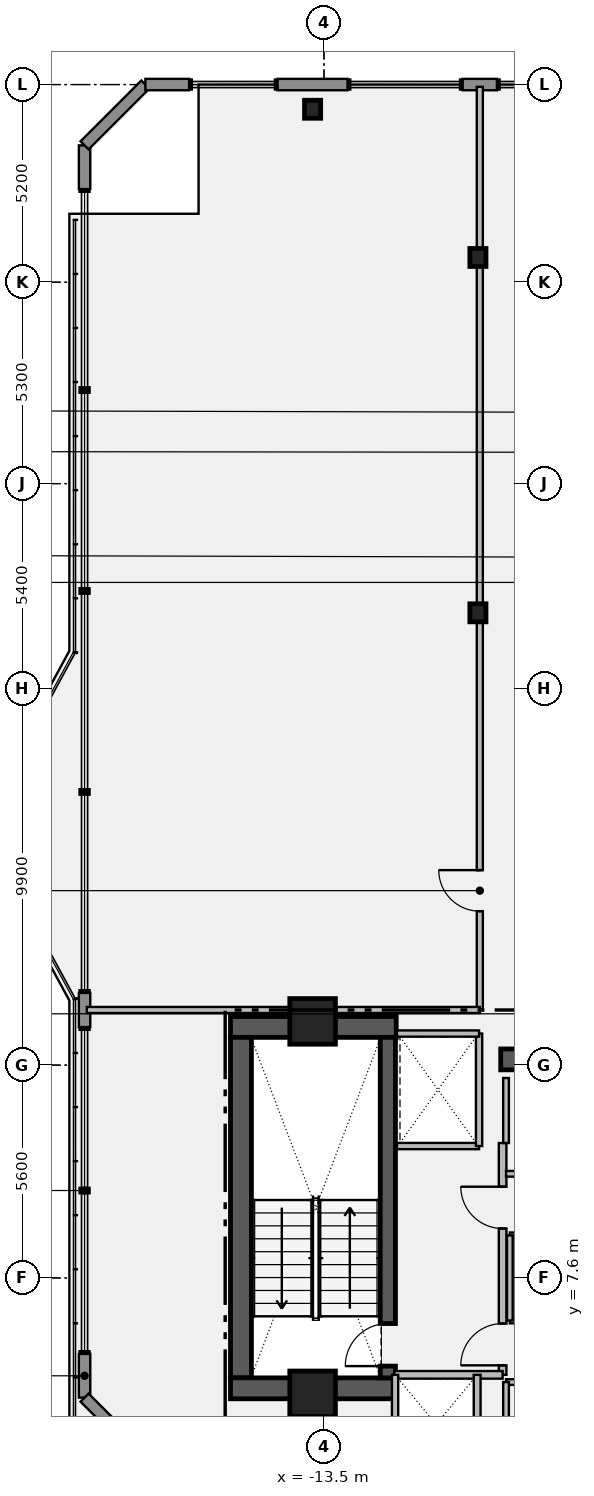
"""IFC4 building model, lengths in metres.
Left out: names, types, materials, properties, quantities, classifications, styles, units other than length and angle.
Written with IfcOpenShell. Run it as: python <this file> out.ifc"""

import sys

from ifc_helpers import new_model, si_unit, direction, frame, frame_2d, origin, origin_2d, place, context, subcontext, project, spatial, rectangle, i_section, extrude, element, fill, save


model = new_model("IFC4")
c1 = context("Model", 3, precision=1e-05, world=origin(), true_north=direction((0.0, 1.0)))
c2 = subcontext(c1, "Body", "Model", "MODEL_VIEW")
j1 = project(units=[si_unit("LENGTHUNIT", "METRE"), si_unit("PLANEANGLEUNIT", "RADIAN")], contexts=[c1])
p1 = place(None, origin())
s1 = spatial("IfcSite", under=j1, at=p1, CompositionType="ELEMENT")
p2 = place(p1, origin())
s2 = spatial("IfcBuilding", under=s1, at=p2, CompositionType="ELEMENT")
p3 = place(p2, frame((0.0, 0.0, 297.25)))
s3 = spatial("IfcBuildingStorey", under=s2, at=p3, CompositionType="ELEMENT", Elevation=297.25)
p4 = place(p3, frame((-15.96, 14.205, 0.0), z_axis=(0.0, 0.0, 1.0), x_axis=(1.0, 0.0, 0.0)))
e1 = element("IfcWall", 1, at=p4, inside=s3, PredefinedType="SHEAR", context=c2, shape_type="SweptSolid", body=[
    extrude(rectangle(XDim=4.36, YDim=0.55, at=frame_2d((2.18, 0.0))), origin(), (0.0, 0.0, 1.0), 3.61),
])
p5 = place(p3, frame((-15.685, 4.97, 0.0), z_axis=(0.0, 0.0, 1.0), x_axis=(0.0, 1.0, 0.0)))
e2 = element("IfcWall", 2, at=p5, inside=s3, PredefinedType="SHEAR", context=c2, shape_type="SweptSolid", body=[
    extrude(rectangle(XDim=8.96, YDim=0.55, at=frame_2d((4.48, 0.0))), origin(), (0.0, 0.0, 1.0), 3.61),
])
p6 = place(p3, frame((-15.96, 4.695, 0.0), z_axis=(0.0, 0.0, 1.0), x_axis=(1.0, 0.0, 0.0)))
e3 = element("IfcWall", 3, at=p6, inside=s3, PredefinedType="SHEAR", context=c2, shape_type="SweptSolid", body=[
    extrude(rectangle(XDim=4.36, YDim=0.55, at=frame_2d((2.18, 0.0))), origin(), (0.0, 0.0, 1.0), 3.61),
])
p7 = place(p3, frame((-8.85, 13.35, 0.0), z_axis=(0.0, 0.0, 1.0), x_axis=(1.0, 0.0, 0.0)))
e4 = element("IfcWall", 4, at=p7, inside=s3, PredefinedType="SHEAR", context=c2, shape_type="SweptSolid", body=[
    extrude(rectangle(XDim=7.6, YDim=0.55, at=frame_2d((3.8, 0.0))), origin(), (0.0, 0.0, 1.0), 3.56),
])
p8 = place(p3, frame((-11.82, 4.97, 0.0), z_axis=(0.0, 0.0, 1.0), x_axis=(0.0, 1.0, 0.0)))
e5 = element("IfcWall", 5, at=p8, inside=s3, PredefinedType="SHEAR", context=c2, shape_type="SweptSolid", body=[
    extrude(rectangle(XDim=8.96, YDim=0.4, at=frame_2d((4.48, 0.0))), origin(), (0.0, 0.0, 1.0), 3.61),
])
p9 = place(p8, frame((0.31, 0.0, 0.0)))
e6 = element("IfcOpeningElement", 6, at=p9, cuts=e5, PredefinedType="OPENING", context=c2, shape_type="SweptSolid", body=[
    extrude(rectangle(XDim=1.12, YDim=2.22, at=frame_2d((0.56, 1.11))), frame((0.0, 0.21, 0.0), z_axis=(0.0, -1.0, 0.0), x_axis=(1.0, 0.0, 0.0)), (0.0, 0.0, 1.0), 0.42),
])
for number, where, z_axis, x_axis in (
    (7, (-13.8, 14.35, 0.0), (0.0, 0.0, 1.0), (1.0, 0.0, 0.0)),
    (8, (-13.8, 4.55, 0.0), (0.0, 0.0, 1.0), (1.0, 0.0, 0.0)),
):
    element("IfcColumn", number, at=place(p3, frame(where, z_axis=z_axis, x_axis=x_axis)), inside=s3, PredefinedType="COLUMN", context=c2, shape_type="SweptSolid", body=[
        extrude(rectangle(XDim=1.2, YDim=1.2, at=origin_2d()), origin(), (0.0, 0.0, 1.0), 3.8),
    ])
p10 = place(p3, frame((-9.45, 25.1, -0.24), z_axis=(0.0, 0.0, 1.0), x_axis=(1.0, 0.0, 0.0)))
e9 = element("IfcColumn", 9, at=p10, inside=s3, PredefinedType="COLUMN", context=c2, shape_type="SweptSolid", body=[
    extrude(i_section(OverallWidth=0.424, OverallDepth=0.474, WebThickness=0.048, FlangeThickness=0.077, at=origin_2d()), origin(), (0.0, 0.0, 1.0), 4.04),
])
for number, where, z_axis, x_axis in (
    (10, (-9.45, 34.45, 0.0), (0.0, 0.0, 1.0), (1.0, 0.0, 0.0)),
    (11, (-13.8, 38.35, 0.0), (0.0, 0.0, 1.0), (1.0, 0.0, 0.0)),
):
    element("IfcColumn", number, at=place(p3, frame(where, z_axis=z_axis, x_axis=x_axis)), inside=s3, PredefinedType="COLUMN", context=c2, shape_type="SweptSolid", body=[
        extrude(i_section(OverallWidth=0.424, OverallDepth=0.474, WebThickness=0.048, FlangeThickness=0.077, at=origin_2d()), origin(), (0.0, 0.0, 1.0), 3.8),
    ])
p11 = place(p3, frame((-19.8, 4.45, 0.0), z_axis=(0.0, 0.0, 1.0), x_axis=(0.0, 1.0, 0.0)))
e12 = element("IfcWall", 12, at=p11, inside=s3, PredefinedType="STANDARD", context=c2, shape_type="SweptSolid", body=[
    extrude(rectangle(XDim=1.15, YDim=0.3, at=frame_2d((0.575, 0.0))), origin(), (0.0, 0.0, 1.0), 3.56),
])
p12 = place(p3, frame((-19.8, 14.2, 0.0), z_axis=(0.0, 0.0, 1.0), x_axis=(0.0, 1.0, 0.0)))
e13 = element("IfcWall", 13, at=p12, inside=s3, PredefinedType="STANDARD", context=c2, shape_type="SweptSolid", body=[
    extrude(rectangle(XDim=0.9, YDim=0.3, at=frame_2d((0.45, 0.0))), origin(), (0.0, 0.0, 1.0), 3.56),
])
p13 = place(p3, frame((-19.8, 36.25, 0.0), z_axis=(0.0, 0.0, 1.0), x_axis=(0.0, 1.0, 0.0)))
e14 = element("IfcWall", 14, at=p13, inside=s3, PredefinedType="STANDARD", context=c2, shape_type="SweptSolid", body=[
    extrude(rectangle(XDim=1.15, YDim=0.3, at=frame_2d((0.575, 0.0))), origin(), (0.0, 0.0, 1.0), 3.56),
])
p14 = place(p3, frame((-19.8, 37.4, 0.0), z_axis=(0.0, 0.0, 1.0), x_axis=(0.707106781187, 0.707106781187, 0.0)))
e15 = element("IfcWall", 15, at=p14, inside=s3, PredefinedType="STANDARD", context=c2, shape_type="SweptSolid", body=[
    extrude(rectangle(XDim=2.263, YDim=0.3, at=frame_2d((1.131, 0.0))), origin(), (0.0, 0.0, 1.0), 3.56),
])
p15 = place(p3, frame((-18.2, 39.0, 0.0), z_axis=(0.0, 0.0, 1.0), x_axis=(1.0, 0.0, 0.0)))
e16 = element("IfcWall", 16, at=p15, inside=s3, PredefinedType="STANDARD", context=c2, shape_type="SweptSolid", body=[
    extrude(rectangle(XDim=1.15, YDim=0.3, at=frame_2d((0.575, 0.0))), origin(), (0.0, 0.0, 1.0), 3.56),
])
p16 = place(p3, frame((-14.72, 39.0, 0.0), z_axis=(0.0, 0.0, 1.0), x_axis=(1.0, 0.0, 0.0)))
e17 = element("IfcWall", 17, at=p16, inside=s3, PredefinedType="STANDARD", context=c2, shape_type="SweptSolid", body=[
    extrude(rectangle(XDim=1.84, YDim=0.3, at=frame_2d((0.92, 0.0))), origin(), (0.0, 0.0, 1.0), 3.56),
])
p17 = place(p3, frame((-9.85, 39.0, 0.0), z_axis=(0.0, 0.0, 1.0), x_axis=(1.0, 0.0, 0.0)))
e18 = element("IfcWall", 18, at=p17, inside=s3, PredefinedType="STANDARD", context=c2, shape_type="SweptSolid", body=[
    extrude(rectangle(XDim=0.9, YDim=0.3, at=frame_2d((0.45, 0.0))), origin(), (0.0, 0.0, 1.0), 3.56),
])
p18 = place(p3, frame((-18.2, 2.85, 0.0), z_axis=(0.0, 0.0, 1.0), x_axis=(-0.707160727918, 0.707052830339, 0.0)))
e19 = element("IfcWall", 19, at=p18, inside=s3, PredefinedType="STANDARD", context=c2, shape_type="SweptSolid", body=[
    extrude(rectangle(XDim=2.263, YDim=0.3, at=frame_2d((1.131, 0.0))), origin(), (0.0, 0.0, 1.0), 3.56),
])
p19 = place(p3, frame((-8.8, 5.05, 0.0), z_axis=(0.0, 0.0, 1.0), x_axis=(0.0, 1.0, 0.0)))
e20 = element("IfcWall", 20, at=p19, inside=s3, PredefinedType="PARTITIONING", context=c2, shape_type="SweptSolid", body=[
    extrude(rectangle(XDim=6.1, YDim=0.2, at=frame_2d((3.05, 0.0))), origin(), (0.0, 0.0, 1.0), 3.56),
])
p20 = place(p19, frame((0.25, 0.0, 0.0)))
e21 = element("IfcOpeningElement", 21, at=p20, cuts=e20, PredefinedType="OPENING", context=c2, shape_type="SweptSolid", body=[
    extrude(rectangle(XDim=1.1, YDim=2.2, at=frame_2d((0.55, 1.1))), frame((0.0, 0.11, 0.0), z_axis=(0.0, -1.0, 0.0), x_axis=(1.0, 0.0, 0.0)), (0.0, 0.0, 1.0), 0.22),
])
p21 = place(p19, frame((3.85, 0.0, 0.0)))
e22 = element("IfcOpeningElement", 22, at=p21, cuts=e20, PredefinedType="OPENING", context=c2, shape_type="SweptSolid", body=[
    extrude(rectangle(XDim=1.1, YDim=2.2, at=frame_2d((0.55, 1.1))), frame((0.0, 0.11, 0.0), z_axis=(0.0, -1.0, 0.0), x_axis=(1.0, 0.0, 0.0)), (0.0, 0.0, 1.0), 0.22),
])
p22 = place(p3, frame((-8.71, 4.86, 0.0), z_axis=(0.0, 0.0, 1.0), x_axis=(1.0, 0.0, 0.0)))
e23 = element("IfcWall", 23, at=p22, inside=s3, PredefinedType="PARTITIONING", context=c2, shape_type="SweptSolid", body=[
    extrude(rectangle(XDim=5.67, YDim=0.15, at=frame_2d((2.835, 0.0))), origin(), (0.0, 0.0, 1.0), 3.56),
])
p23 = place(p22, frame((2.385, 0.0, 0.0)))
e24 = element("IfcOpeningElement", 24, at=p23, cuts=e23, PredefinedType="OPENING", context=c2, shape_type="SweptSolid", body=[
    extrude(rectangle(XDim=0.9, YDim=2.15, at=frame_2d((0.45, 1.075))), frame((0.0, 0.085, 0.0), z_axis=(0.0, -1.0, 0.0), x_axis=(1.0, 0.0, 0.0)), (0.0, 0.0, 1.0), 0.17),
])
p24 = place(p3, frame((-8.71, 10.34, 0.0), z_axis=(0.0, 0.0, 1.0), x_axis=(1.0, 0.0, 0.0)))
e25 = element("IfcWall", 25, at=p24, inside=s3, PredefinedType="PARTITIONING", context=c2, shape_type="SweptSolid", body=[
    extrude(rectangle(XDim=3.87, YDim=0.15, at=frame_2d((1.935, 0.0))), origin(), (0.0, 0.0, 1.0), 3.56),
])
p25 = place(p24, frame((1.485, 0.0, 0.0)))
e26 = element("IfcOpeningElement", 26, at=p25, cuts=e25, PredefinedType="OPENING", context=c2, shape_type="SweptSolid", body=[
    extrude(rectangle(XDim=0.9, YDim=2.15, at=frame_2d((0.45, 1.075))), frame((0.0, 0.085, 0.0), z_axis=(0.0, -1.0, 0.0), x_axis=(1.0, 0.0, 0.0)), (0.0, 0.0, 1.0), 0.17),
])
p26 = place(p3, frame((-8.61, 6.48, 0.0), z_axis=(0.0, 0.0, 1.0), x_axis=(1.0, 0.0, 0.0)))
e27 = element("IfcWall", 27, at=p26, inside=s3, PredefinedType="PARTITIONING", context=c2, shape_type="SweptSolid", body=[
    extrude(rectangle(XDim=3.62, YDim=0.15, at=frame_2d((1.81, 0.0))), origin(), (0.0, 0.0, 1.0), 3.56),
])
p27 = place(p26, frame((1.36, 0.0, 0.0)))
e28 = element("IfcOpeningElement", 28, at=p27, cuts=e27, PredefinedType="OPENING", context=c2, shape_type="SweptSolid", body=[
    extrude(rectangle(XDim=0.9, YDim=2.15, at=frame_2d((0.45, 1.075))), frame((0.0, 0.085, 0.0), z_axis=(0.0, -1.0, 0.0), x_axis=(1.0, 0.0, 0.0)), (0.0, 0.0, 1.0), 0.17),
])
p28 = place(p3, frame((-9.4, 14.65, 0.0), z_axis=(0.0, 0.0, 1.0), x_axis=(0.0, 1.0, 0.0)))
e29 = element("IfcWall", 29, at=p28, inside=s3, PredefinedType="PARTITIONING", context=c2, shape_type="SweptSolid", body=[
    extrude(rectangle(XDim=24.29, YDim=0.16, at=frame_2d((12.145, 0.0))), origin(), (0.0, 0.0, 1.0), 2.442),
])
p29 = place(p28, frame((2.6, 0.0, 0.0)))
e30 = element("IfcOpeningElement", 30, at=p29, cuts=e29, PredefinedType="OPENING", context=c2, shape_type="SweptSolid", body=[
    extrude(rectangle(XDim=1.08, YDim=2.18, at=frame_2d((0.54, 1.09))), frame((0.0, 0.09, 0.0), z_axis=(0.0, -1.0, 0.0), x_axis=(1.0, 0.0, 0.0)), (0.0, 0.0, 1.0), 0.18),
])
p30 = place(p3, frame((-11.65, 5.05, 0.0), z_axis=(0.0, 0.0, 1.0), x_axis=(1.0, 0.0, 0.0)))
e31 = element("IfcWall", 31, at=p30, inside=s3, PredefinedType="PARTITIONING", context=c2, shape_type="SweptSolid", body=[
    extrude(rectangle(XDim=2.85, YDim=0.2, at=frame_2d((1.425, 0.0))), origin(), (0.0, 0.0, 1.0), 3.56),
])
p31 = place(p3, frame((-11.58, 11.07, 0.0), z_axis=(0.0, 0.0, 1.0), x_axis=(1.0, 0.0, 0.0)))
e32 = element("IfcWall", 32, at=p31, inside=s3, PredefinedType="PARTITIONING", context=c2, shape_type="SweptSolid", body=[
    extrude(rectangle(XDim=2.16, YDim=0.165, at=frame_2d((1.08, 0.0))), origin(), (0.0, 0.0, 1.0), 3.56),
])
p32 = place(p3, frame((-9.42, 11.07, 0.0), z_axis=(0.0, 0.0, 1.0), x_axis=(0.0, 1.0, 0.0)))
e33 = element("IfcWall", 33, at=p32, inside=s3, PredefinedType="PARTITIONING", context=c2, shape_type="SweptSolid", body=[
    extrude(rectangle(XDim=2.96, YDim=0.165, at=frame_2d((1.48, 0.0))), origin(), (0.0, 0.0, 1.0), 3.56),
])
p33 = place(p3, frame((-11.58, 14.03, 0.0), z_axis=(0.0, 0.0, 1.0), x_axis=(1.0, 0.0, 0.0)))
e34 = element("IfcWall", 34, at=p33, inside=s3, PredefinedType="PARTITIONING", context=c2, shape_type="SweptSolid", body=[
    extrude(rectangle(XDim=2.16, YDim=0.165, at=frame_2d((1.08, 0.0))), origin(), (0.0, 0.0, 1.0), 3.56),
])
p34 = place(p3, frame((-8.71, 2.49, 0.0), z_axis=(0.0, 0.0, 1.0), x_axis=(0.0, 1.0, 0.0)))
e35 = element("IfcWall", 35, at=p34, inside=s3, PredefinedType="PARTITIONING", context=c2, shape_type="SweptSolid", body=[
    extrude(rectangle(XDim=2.37, YDim=0.15, at=frame_2d((1.185, 0.0))), origin(), (0.0, 0.0, 1.0), 3.56),
])
p35 = place(p3, frame((-8.71, 11.15, 0.0), z_axis=(0.0, 0.0, 1.0), x_axis=(0.0, 1.0, 0.0)))
e36 = element("IfcWall", 36, at=p35, inside=s3, PredefinedType="PARTITIONING", context=c2, shape_type="SweptSolid", body=[
    extrude(rectangle(XDim=1.71, YDim=0.15, at=frame_2d((0.855, 0.0))), origin(), (0.0, 0.0, 1.0), 3.56),
])
p36 = place(p3, frame((-9.47, 2.45, 0.0), z_axis=(0.0, 0.0, 1.0), x_axis=(0.0, 1.0, 0.0)))
e37 = element("IfcWall", 37, at=p36, inside=s3, PredefinedType="PARTITIONING", context=c2, shape_type="SweptSolid", body=[
    extrude(rectangle(XDim=2.6, YDim=0.18, at=frame_2d((1.3, 0.0))), origin(), (0.0, 0.0, 1.0), 3.56),
])
p37 = place(p3, frame((-11.63, 2.47, 0.0), z_axis=(0.0, 0.0, 1.0), x_axis=(0.0, 1.0, 0.0)))
e38 = element("IfcWall", 38, at=p37, inside=s3, PredefinedType="PARTITIONING", context=c2, shape_type="SweptSolid", body=[
    extrude(rectangle(XDim=2.58, YDim=0.165, at=frame_2d((1.29, 0.0))), origin(), (0.0, 0.0, 1.0), 3.56),
])
p38 = place(p3, frame((-8.61, 8.72, 0.0), z_axis=(0.0, 0.0, 1.0), x_axis=(1.0, 0.0, 0.0)))
e39 = element("IfcWall", 39, at=p38, inside=s3, PredefinedType="PARTITIONING", context=c2, shape_type="SweptSolid", body=[
    extrude(rectangle(XDim=3.62, YDim=0.15, at=frame_2d((1.81, 0.0))), origin(), (0.0, 0.0, 1.0), 3.56),
])
p39 = place(p3, frame((-8.61, 6.48, 0.0), z_axis=(0.0, 0.0, 1.0), x_axis=(0.0, 1.0, 0.0)))
e40 = element("IfcWall", 40, at=p39, inside=s3, PredefinedType="PARTITIONING", context=c2, shape_type="SweptSolid", body=[
    extrude(rectangle(XDim=2.24, YDim=0.15, at=frame_2d((1.12, 0.0))), origin(), (0.0, 0.0, 1.0), 3.56),
])
p40 = place(p3, frame((-19.74, 14.65, 0.0), z_axis=(0.0, 0.0, 1.0), x_axis=(1.0, 0.0, 0.0)))
e41 = element("IfcWall", 41, at=p40, inside=s3, PredefinedType="PARTITIONING", context=c2, shape_type="SweptSolid", body=[
    extrude(rectangle(XDim=10.34, YDim=0.16, at=frame_2d((5.17, 0.0))), origin(), (0.0, 0.0, 1.0), 3.56),
])
p41 = place(p9, origin())
e42 = element("IfcDoor", 42, at=p41, inside=s3, OperationType="SINGLE_SWING_LEFT", PredefinedType="DOOR", context=c2, shape_type="SweptSolid", body=[
    extrude(rectangle(XDim=1.12, YDim=2.22, at=frame_2d((0.56, 1.11))), frame((0.0, 0.025, 0.0), z_axis=(0.0, -1.0, 0.0), x_axis=(1.0, 0.0, 0.0)), (0.0, 0.0, 1.0), 0.05),
])
fill(e6, e42)
p42 = place(p20, origin())
e43 = element("IfcDoor", 43, at=p42, inside=s3, OperationType="SINGLE_SWING_LEFT", PredefinedType="DOOR", context=c2, shape_type="SweptSolid", body=[
    extrude(rectangle(XDim=1.1, YDim=2.2, at=frame_2d((0.55, 1.1))), frame((0.0, 0.025, 0.0), z_axis=(0.0, -1.0, 0.0), x_axis=(1.0, 0.0, 0.0)), (0.0, 0.0, 1.0), 0.05),
])
fill(e21, e43)
p43 = place(p21, origin())
e44 = element("IfcDoor", 44, at=p43, inside=s3, OperationType="SINGLE_SWING_RIGHT", PredefinedType="DOOR", context=c2, shape_type="SweptSolid", body=[
    extrude(rectangle(XDim=1.1, YDim=2.2, at=frame_2d((0.55, 1.1))), frame((0.0, 0.025, 0.0), z_axis=(0.0, -1.0, 0.0), x_axis=(1.0, 0.0, 0.0)), (0.0, 0.0, 1.0), 0.05),
])
fill(e22, e44)
p44 = place(p29, origin())
e45 = element("IfcDoor", 45, at=p44, inside=s3, OperationType="SINGLE_SWING_RIGHT", PredefinedType="DOOR", context=c2, shape_type="SweptSolid", body=[
    extrude(rectangle(XDim=1.08, YDim=2.18, at=frame_2d((0.54, 1.09))), frame((0.0, 0.025, 0.0), z_axis=(0.0, -1.0, 0.0), x_axis=(1.0, 0.0, 0.0)), (0.0, 0.0, 1.0), 0.05),
])
fill(e30, e45)
save(model, sys.argv[1])
